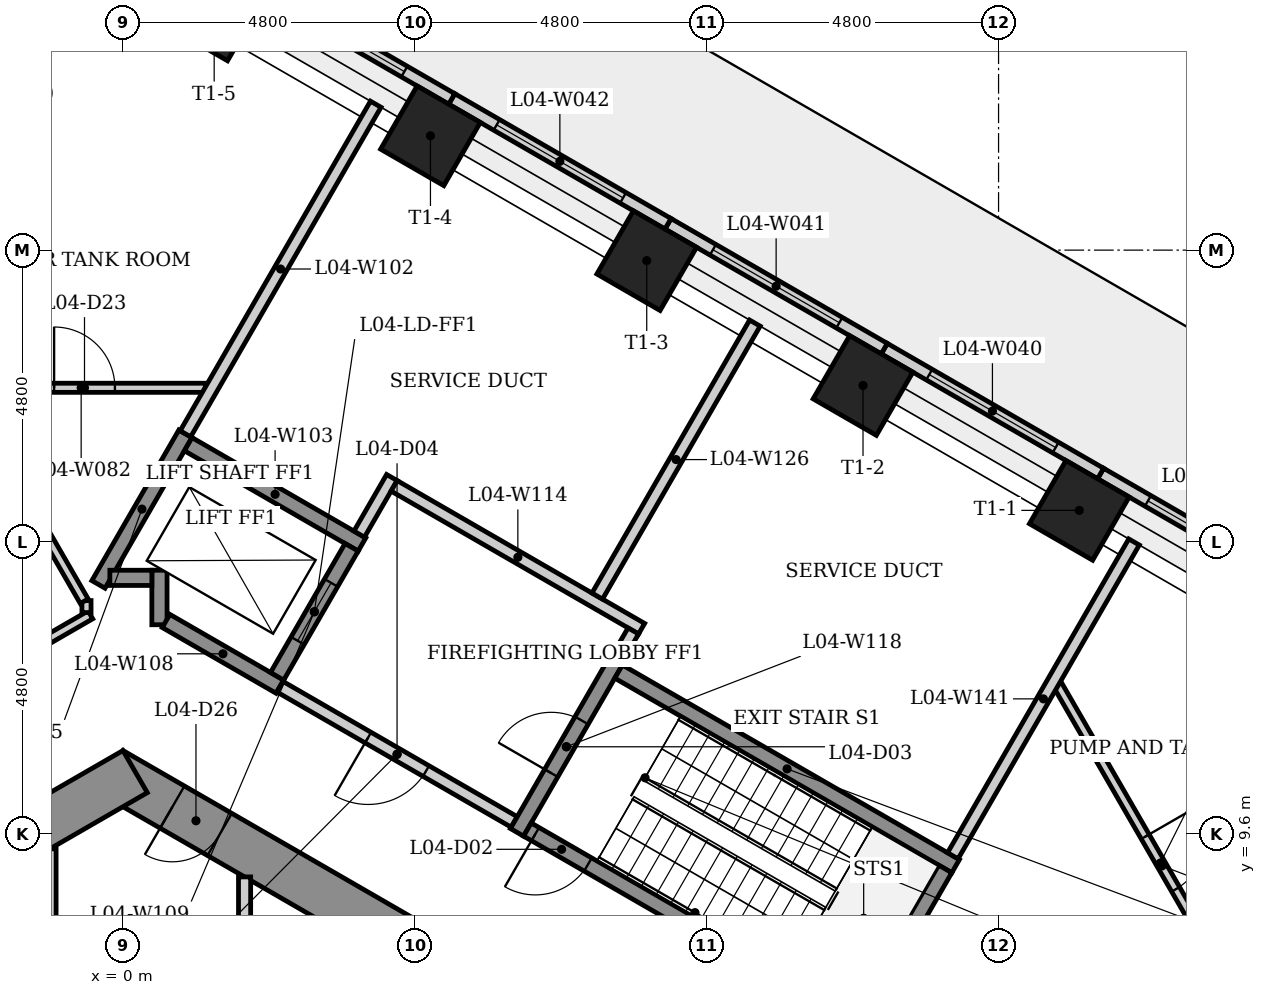
"""IFC4 building model, lengths in metres.
Left out: names, types, materials, properties, quantities, classifications, styles, units other than length and angle.
Written with IfcOpenShell. Run it as: python <this file> out.ifc"""

import sys

from ifc_helpers import new_model, si_unit, direction, frame, frame_2d, origin, origin_2d, place, context, subcontext, project, spatial, rectangle, extrude, element, fill, save


model = new_model("IFC4")
c1 = context("Model", 3, precision=1e-05, world=origin(), true_north=direction((0.0, 1.0)))
c2 = subcontext(c1, "Body", "Model", "MODEL_VIEW")
j1 = project(units=[si_unit("LENGTHUNIT", "METRE"), si_unit("PLANEANGLEUNIT", "RADIAN")], contexts=[c1])
p1 = place(None, origin())
s1 = spatial("IfcSite", under=j1, at=p1, CompositionType="ELEMENT")
p2 = place(p1, origin())
s2 = spatial("IfcBuilding", under=s1, at=p2, CompositionType="ELEMENT")
p3 = place(p2, frame((0.0, 0.0, 20.5)))
s3 = spatial("IfcBuildingStorey", under=s2, at=p3, CompositionType="ELEMENT", Elevation=20.5)
p4 = place(p3, frame((9.3, 5.138, 0.0), z_axis=(0.0, 0.0, 1.0), x_axis=(-0.866023993627, 0.500002442456, 0.0)))
e1 = element("IfcWall", 1, at=p4, inside=s3, PredefinedType="SHEAR", context=c2, shape_type="SweptSolid", body=[
    extrude(rectangle(XDim=10.97, YDim=0.8, at=frame_2d((5.485, 0.0))), origin(), (0.0, 0.0, 1.0), 5.0),
])
p5 = place(p4, frame((8.903, 0.0, 0.0)))
e2 = element("IfcOpeningElement", 2, at=p5, cuts=e1, PredefinedType="OPENING", context=c2, shape_type="SweptSolid", body=[
    extrude(rectangle(XDim=0.9, YDim=2.1, at=frame_2d((0.45, 1.05))), frame((0.0, 0.41, 0.0), z_axis=(0.0, -1.0, 0.0), x_axis=(1.0, 0.0, 0.0)), (0.0, 0.0, 1.0), 0.82),
])
p6 = place(p4, frame((2.269, 0.0, 0.0)))
e3 = element("IfcOpeningElement", 3, at=p6, cuts=e1, PredefinedType="OPENING", context=c2, shape_type="SweptSolid", body=[
    extrude(rectangle(XDim=0.9, YDim=2.1, at=frame_2d((0.45, 1.05))), frame((0.0, 0.41, 0.0), z_axis=(0.0, -1.0, 0.0), x_axis=(1.0, 0.0, 0.0)), (0.0, 0.0, 1.0), 0.82),
])
p7 = place(p3, frame((0.2, 10.623, 0.0), z_axis=(0.0, 0.0, 1.0), x_axis=(-0.866023993627, -0.500002442456, 0.0)))
e4 = element("IfcWall", 4, at=p7, inside=s3, PredefinedType="SHEAR", context=c2, shape_type="SweptSolid", body=[
    extrude(rectangle(XDim=10.97, YDim=0.8, at=frame_2d((5.485, 0.0))), origin(), (0.0, 0.0, 1.0), 5.0),
])
p8 = place(p7, frame((7.339, 0.0, 0.0)))
e5 = element("IfcOpeningElement", 5, at=p8, cuts=e4, PredefinedType="OPENING", context=c2, shape_type="SweptSolid", body=[
    extrude(rectangle(XDim=0.9, YDim=2.1, at=frame_2d((0.45, 1.05))), frame((0.0, 0.41, 0.0), z_axis=(0.0, -1.0, 0.0), x_axis=(1.0, 0.0, 0.0)), (0.0, 0.0, 1.0), 0.82),
])
for number, where, z_axis, x_axis in (
    (6, (15.728, 14.92, 0.0), (0.0, 0.0, 1.0), (0.5, 0.866, 0.0)),
    (7, (12.171, 16.973, 0.0), (0.0, 0.0, 1.0), (0.5, 0.866, 0.0)),
    (8, (8.614, 19.027, 0.0), (0.0, 0.0, 1.0), (0.5, 0.866, 0.0)),
    (9, (5.057, 21.08, 0.0), (0.0, 0.0, 1.0), (0.5, 0.866, 0.0)),
    (10, (1.5, 23.134, 0.0), (0.0, 0.0, 1.0), (0.5, 0.866, 0.0)),
    (11, (-1.5, 23.134, 0.0), (0.0, 0.0, 1.0), (-0.5, 0.866, 0.0)),
):
    element("IfcColumn", number, at=place(p3, frame(where, z_axis=z_axis, x_axis=x_axis)), inside=s3, PredefinedType="COLUMN", context=c2, shape_type="SweptSolid", body=[
        extrude(rectangle(XDim=1.2, YDim=1.2, at=origin_2d()), origin(), (0.0, 0.0, 1.0), 5.0),
    ])
p9 = place(p3, frame((19.714, 13.426, 0.0), z_axis=(0.0, 0.0, 1.0), x_axis=(-0.866041321553, 0.499972428603, 0.0)))
e12 = element("IfcWall", 12, at=p9, inside=s3, PredefinedType="SOLIDWALL", context=c2, shape_type="SweptSolid", body=[
    extrude(rectangle(XDim=4.199, YDim=0.2, at=frame_2d((2.1, 0.0))), origin(), (0.0, 0.0, 1.0), 4.88),
])
p10 = place(p9, frame((0.899, 0.0, 0.8)))
e13 = element("IfcOpeningElement", 13, at=p10, cuts=e12, PredefinedType="OPENING", context=c2, shape_type="SweptSolid", body=[
    extrude(rectangle(XDim=2.4, YDim=2.4, at=frame_2d((1.2, 1.2))), frame((0.0, 0.11, 0.0), z_axis=(0.0, -1.0, 0.0), x_axis=(1.0, 0.0, 0.0)), (0.0, 0.0, 1.0), 0.22),
])
p11 = place(p3, frame((16.078, 15.526, 0.0), z_axis=(0.0, 0.0, 1.0), x_axis=(-0.866029215606, 0.499993397673, 0.0)))
e14 = element("IfcWall", 14, at=p11, inside=s3, PredefinedType="SOLIDWALL", context=c2, shape_type="SweptSolid", body=[
    extrude(rectangle(XDim=4.108, YDim=0.2, at=frame_2d((2.054, 0.0))), origin(), (0.0, 0.0, 1.0), 4.88),
])
p12 = place(p11, frame((0.854, 0.0, 0.8)))
e15 = element("IfcOpeningElement", 15, at=p12, cuts=e14, PredefinedType="OPENING", context=c2, shape_type="SweptSolid", body=[
    extrude(rectangle(XDim=2.4, YDim=2.4, at=frame_2d((1.2, 1.2))), frame((0.0, 0.11, 0.0), z_axis=(0.0, -1.0, 0.0), x_axis=(1.0, 0.0, 0.0)), (0.0, 0.0, 1.0), 0.22),
])
p13 = place(p3, frame((12.52, 17.58, 0.0), z_axis=(0.0, 0.0, 1.0), x_axis=(-0.866021252249, 0.500007190601, 0.0)))
e16 = element("IfcWall", 16, at=p13, inside=s3, PredefinedType="SOLIDWALL", context=c2, shape_type="SweptSolid", body=[
    extrude(rectangle(XDim=4.107, YDim=0.2, at=frame_2d((2.053, 0.0))), origin(), (0.0, 0.0, 1.0), 4.88),
])
p14 = place(p13, frame((0.854, 0.0, 0.8)))
e17 = element("IfcOpeningElement", 17, at=p14, cuts=e16, PredefinedType="OPENING", context=c2, shape_type="SweptSolid", body=[
    extrude(rectangle(XDim=2.4, YDim=2.4, at=frame_2d((1.2, 1.2))), frame((0.0, 0.11, 0.0), z_axis=(0.0, -1.0, 0.0), x_axis=(1.0, 0.0, 0.0)), (0.0, 0.0, 1.0), 0.22),
])
p15 = place(p3, frame((8.964, 19.633, 0.0), z_axis=(0.0, 0.0, 1.0), x_axis=(-0.866010373586, 0.500026032164, 0.0)))
e18 = element("IfcWall", 18, at=p15, inside=s3, PredefinedType="SOLIDWALL", context=c2, shape_type="SweptSolid", body=[
    extrude(rectangle(XDim=4.107, YDim=0.2, at=frame_2d((2.054, 0.0))), origin(), (0.0, 0.0, 1.0), 4.88),
])
p16 = place(p15, frame((0.854, 0.0, 0.8)))
e19 = element("IfcOpeningElement", 19, at=p16, cuts=e18, PredefinedType="OPENING", context=c2, shape_type="SweptSolid", body=[
    extrude(rectangle(XDim=2.4, YDim=2.4, at=frame_2d((1.2, 1.2))), frame((0.0, 0.11, 0.0), z_axis=(0.0, -1.0, 0.0), x_axis=(1.0, 0.0, 0.0)), (0.0, 0.0, 1.0), 0.22),
])
p17 = place(p3, frame((5.407, 21.687, 0.0), z_axis=(0.0, 0.0, 1.0), x_axis=(-0.866016145416, 0.500016035621, 0.0)))
e20 = element("IfcWall", 20, at=p17, inside=s3, PredefinedType="SOLIDWALL", context=c2, shape_type="SweptSolid", body=[
    extrude(rectangle(XDim=4.199, YDim=0.2, at=frame_2d((2.1, 0.0))), origin(), (0.0, 0.0, 1.0), 4.88),
])
p18 = place(p17, frame((0.9, 0.0, 0.8)))
e21 = element("IfcOpeningElement", 21, at=p18, cuts=e20, PredefinedType="OPENING", context=c2, shape_type="SweptSolid", body=[
    extrude(rectangle(XDim=2.4, YDim=2.4, at=frame_2d((1.2, 1.2))), frame((0.0, 0.11, 0.0), z_axis=(0.0, -1.0, 0.0), x_axis=(1.0, 0.0, 0.0)), (0.0, 0.0, 1.0), 0.22),
])
p19 = place(p3, frame((-10.825, 7.26, 0.0), z_axis=(0.0, 0.0, 1.0), x_axis=(0.866026819738, 0.499997547488, 0.0)))
e22 = element("IfcWall", 22, at=p19, inside=s3, PredefinedType="PARTITIONING", context=c2, shape_type="SweptSolid", body=[
    extrude(rectangle(XDim=11.882, YDim=0.15, at=frame_2d((5.941, 0.0))), origin(), (0.0, 0.0, 1.0), 4.65),
])
p20 = place(p19, frame((7.264, 0.0, 0.0)))
e23 = element("IfcOpeningElement", 23, at=p20, cuts=e22, PredefinedType="OPENING", context=c2, shape_type="SweptSolid", body=[
    extrude(rectangle(XDim=1.0, YDim=2.1, at=frame_2d((0.5, 1.05))), frame((0.0, 0.085, 0.0), z_axis=(0.0, -1.0, 0.0), x_axis=(1.0, 0.0, 0.0)), (0.0, 0.0, 1.0), 0.17),
])
p21 = place(p3, frame((-2.739, 16.936, 0.0), z_axis=(0.0, 0.0, 1.0), x_axis=(1.0, 0.0, 0.0)))
e24 = element("IfcWall", 24, at=p21, inside=s3, PredefinedType="PARTITIONING", context=c2, shape_type="SweptSolid", body=[
    extrude(rectangle(XDim=4.103, YDim=0.15, at=frame_2d((2.052, 0.0))), origin(), (0.0, 0.0, 1.0), 4.65),
])
p22 = place(p21, frame((1.606, 0.0, 0.0)))
e25 = element("IfcOpeningElement", 25, at=p22, cuts=e24, PredefinedType="OPENING", context=c2, shape_type="SweptSolid", body=[
    extrude(rectangle(XDim=1.0, YDim=2.1, at=frame_2d((0.5, 1.05))), frame((0.0, 0.085, 0.0), z_axis=(0.0, -1.0, 0.0), x_axis=(1.0, 0.0, 0.0)), (0.0, 0.0, 1.0), 0.17),
])
p23 = place(p3, frame((-1.2, 9.353, 0.0), z_axis=(0.0, 0.0, 1.0), x_axis=(0.0, -1.0, 0.0)))
e26 = element("IfcWall", 26, at=p23, inside=s3, PredefinedType="PARTITIONING", context=c2, shape_type="SweptSolid", body=[
    extrude(rectangle(XDim=4.078, YDim=0.2, at=frame_2d((2.039, 0.0))), origin(), (0.0, 0.0, 1.0), 4.65),
])
p24 = place(p3, frame((-0.6, 13.239, 0.0), z_axis=(0.0, 0.0, 1.0), x_axis=(0.0, 1.0, 0.0)))
e27 = element("IfcWall", 27, at=p24, inside=s3, PredefinedType="PARTITIONING", context=c2, shape_type="SweptSolid", body=[
    extrude(rectangle(XDim=0.197, YDim=0.15, at=frame_2d((0.099, 0.0))), origin(), (0.0, 0.0, 1.0), 4.65),
])
p25 = place(p3, frame((-0.637, 13.426, 0.0), z_axis=(0.0, 0.0, 1.0), x_axis=(-0.500046503579, 0.865998553266, 0.0)))
e28 = element("IfcWall", 28, at=p25, inside=s3, PredefinedType="PARTITIONING", context=c2, shape_type="SweptSolid", body=[
    extrude(rectangle(XDim=3.978, YDim=0.15, at=frame_2d((1.989, 0.0))), origin(), (0.0, 0.0, 1.0), 4.65),
])
p26 = place(p3, frame((-0.403, 13.702, 0.0), z_axis=(0.0, 0.0, 1.0), x_axis=(0.499976111731, 0.866039195244, 0.0)))
e29 = element("IfcWall", 29, at=p26, inside=s3, PredefinedType="SHEAR", context=c2, shape_type="SweptSolid", body=[
    extrude(rectangle(XDim=2.861, YDim=0.25, at=frame_2d((1.43, 0.0))), origin(), (0.0, 0.0, 1.0), 4.65),
])
p27 = place(p3, frame((0.6, 13.039, 0.0), z_axis=(0.0, 0.0, 1.0), x_axis=(0.0, 1.0, 0.0)))
e30 = element("IfcWall", 30, at=p27, inside=s3, PredefinedType="SHEAR", context=c2, shape_type="SweptSolid", body=[
    extrude(rectangle(XDim=0.896, YDim=0.25, at=frame_2d((0.448, 0.0))), origin(), (0.0, 0.0, 1.0), 4.65),
])
p28 = place(p3, frame((0.475, 13.81, 0.0), z_axis=(0.0, 0.0, 1.0), x_axis=(-1.0, 0.0, 0.0)))
e31 = element("IfcWall", 31, at=p28, inside=s3, PredefinedType="SHEAR", context=c2, shape_type="SweptSolid", body=[
    extrude(rectangle(XDim=0.691, YDim=0.25, at=frame_2d((0.345, 0.0))), origin(), (0.0, 0.0, 1.0), 5.0),
])
p29 = place(p3, frame((1.027, 16.179, 0.0), z_axis=(0.0, 0.0, 1.0), x_axis=(0.499998165157, 0.866026463129, 0.0)))
e32 = element("IfcWall", 32, at=p29, inside=s3, PredefinedType="PLUMBINGWALL", context=c2, shape_type="SweptSolid", body=[
    extrude(rectangle(XDim=6.26, YDim=0.2, at=frame_2d((3.13, 0.0))), origin(), (0.0, 0.0, 1.0), 4.65),
])
p30 = place(p3, frame((1.073, 16.008, 0.0), z_axis=(0.0, 0.0, 1.0), x_axis=(0.866040211805, -0.499974350878, 0.0)))
e33 = element("IfcWall", 33, at=p30, inside=s3, PredefinedType="SHEAR", context=c2, shape_type="SweptSolid", body=[
    extrude(rectangle(XDim=3.3, YDim=0.25, at=frame_2d((1.65, 0.0))), origin(), (0.0, 0.0, 1.0), 4.65),
])
p31 = place(p3, frame((2.0, 8.891, 0.0), z_axis=(0.0, 0.0, 1.0), x_axis=(0.0, -1.0, 0.0)))
e34 = element("IfcWall", 34, at=p31, inside=s3, PredefinedType="PARTITIONING", context=c2, shape_type="SweptSolid", body=[
    extrude(rectangle(XDim=3.616, YDim=0.2, at=frame_2d((1.808, 0.0))), origin(), (0.0, 0.0, 1.0), 4.65),
])
p32 = place(p3, frame((2.581, 12.02, 0.0), z_axis=(0.0, 0.0, 1.0), x_axis=(-0.86603892542, 0.499976579108, 0.0)))
e35 = element("IfcWall", 35, at=p32, inside=s3, PredefinedType="SHEAR", context=c2, shape_type="SweptSolid", body=[
    extrude(rectangle(XDim=2.162, YDim=0.25, at=frame_2d((1.081, 0.0))), origin(), (0.0, 0.0, 1.0), 4.65),
])
p33 = place(p3, frame((2.535, 12.191, 0.0), z_axis=(0.0, 0.0, 1.0), x_axis=(0.500061746146, 0.865989751695, 0.0)))
e36 = element("IfcWall", 36, at=p33, inside=s3, PredefinedType="SHEAR", context=c2, shape_type="SweptSolid", body=[
    extrude(rectangle(XDim=2.45, YDim=0.25, at=frame_2d((1.225, 0.0))), origin(), (0.0, 0.0, 1.0), 5.0),
])
p34 = place(p33, frame((0.675, 0.0, 0.0)))
e37 = element("IfcOpeningElement", 37, at=p34, cuts=e36, PredefinedType="OPENING", context=c2, shape_type="SweptSolid", body=[
    extrude(rectangle(XDim=1.1, YDim=2.1, at=frame_2d((0.55, 1.05))), frame((0.0, 0.135, 0.0), z_axis=(0.0, -1.0, 0.0), x_axis=(1.0, 0.0, 0.0)), (0.0, 0.0, 1.0), 0.27),
])
p35 = place(p3, frame((3.885, 14.529, 0.0), z_axis=(0.0, 0.0, 1.0), x_axis=(0.499997628298, 0.866026773083, 0.0)))
e38 = element("IfcWall", 38, at=p35, inside=s3, PredefinedType="PLUMBINGWALL", context=c2, shape_type="SweptSolid", body=[
    extrude(rectangle(XDim=1.075, YDim=0.2, at=frame_2d((0.538, 0.0))), origin(), (0.0, 0.0, 1.0), 4.65),
])
p36 = place(p3, frame((4.459, 15.323, 0.0), z_axis=(0.0, 0.0, 1.0), x_axis=(0.866016039709, -0.500016218704, 0.0)))
e39 = element("IfcWall", 39, at=p36, inside=s3, PredefinedType="PLUMBINGWALL", context=c2, shape_type="SweptSolid", body=[
    extrude(rectangle(XDim=4.7, YDim=0.2, at=frame_2d((2.35, 0.0))), origin(), (0.0, 0.0, 1.0), 4.65),
])
p37 = place(p3, frame((6.435, 9.795, 0.0), z_axis=(0.0, 0.0, 1.0), x_axis=(-0.866012907634, 0.500021643343, 0.0)))
e40 = element("IfcWall", 40, at=p37, inside=s3, PredefinedType="PARTITIONING", context=c2, shape_type="SweptSolid", body=[
    extrude(rectangle(XDim=4.45, YDim=0.2, at=frame_2d((2.225, 0.0))), origin(), (0.0, 0.0, 1.0), 4.65),
])
p38 = place(p37, frame((1.675, 0.0, 0.0)))
e41 = element("IfcOpeningElement", 41, at=p38, cuts=e40, PredefinedType="OPENING", context=c2, shape_type="SweptSolid", body=[
    extrude(rectangle(XDim=1.1, YDim=2.1, at=frame_2d((0.55, 1.05))), frame((0.0, 0.11, 0.0), z_axis=(0.0, -1.0, 0.0), x_axis=(1.0, 0.0, 0.0)), (0.0, 0.0, 1.0), 0.22),
])
p39 = place(p3, frame((6.48, 9.624, 0.0), z_axis=(0.0, 0.0, 1.0), x_axis=(0.500017246033, 0.866015446554, 0.0)))
e42 = element("IfcWall", 42, at=p39, inside=s3, PredefinedType="SHEAR", context=c2, shape_type="SweptSolid", body=[
    extrude(rectangle(XDim=3.25, YDim=0.25, at=frame_2d((1.625, 0.0))), origin(), (0.0, 0.0, 1.0), 4.65),
])
p40 = place(p39, frame((1.125, 0.0, 0.0)))
e43 = element("IfcOpeningElement", 43, at=p40, cuts=e42, PredefinedType="OPENING", context=c2, shape_type="SweptSolid", body=[
    extrude(rectangle(XDim=1.0, YDim=2.1, at=frame_2d((0.5, 1.05))), frame((0.0, 0.135, 0.0), z_axis=(0.0, -1.0, 0.0), x_axis=(1.0, 0.0, 0.0)), (0.0, 0.0, 1.0), 0.27),
])
p41 = place(p3, frame((7.8, 13.51, 0.0), z_axis=(0.0, 0.0, 1.0), x_axis=(0.499998276493, 0.866026398849, 0.0)))
e44 = element("IfcWall", 44, at=p41, inside=s3, PredefinedType="PLUMBINGWALL", context=c2, shape_type="SweptSolid", body=[
    extrude(rectangle(XDim=5.185, YDim=0.2, at=frame_2d((2.592, 0.0))), origin(), (0.0, 0.0, 1.0), 4.65),
])
p42 = place(p3, frame((8.151, 12.268, 0.0), z_axis=(0.0, 0.0, 1.0), x_axis=(0.866025499775, -0.499999833739, 0.0)))
e45 = element("IfcWall", 45, at=p42, inside=s3, PredefinedType="SHEAR", context=c2, shape_type="SweptSolid", body=[
    extrude(rectangle(XDim=6.4, YDim=0.25, at=frame_2d((3.2, 0.0))), origin(), (0.0, 0.0, 1.0), 4.65),
])
p43 = place(p3, frame((8.393, 12.937, 0.0), z_axis=(0.0, 0.0, 1.0), x_axis=(-0.500065409566, -0.86598763626, 0.0)))
e46 = element("IfcWall", 46, at=p43, inside=s3, PredefinedType="PLUMBINGWALL", context=c2, shape_type="SweptSolid", body=[
    extrude(rectangle(XDim=0.575, YDim=0.2, at=frame_2d((0.288, 0.0))), origin(), (0.0, 0.0, 1.0), 4.65),
])
p44 = place(p3, frame((12.194, 6.47, 0.0), z_axis=(0.0, 0.0, 1.0), x_axis=(-0.866025499775, 0.499999833739, 0.0)))
e47 = element("IfcWall", 47, at=p44, inside=s3, PredefinedType="SHEAR", context=c2, shape_type="SweptSolid", body=[
    extrude(rectangle(XDim=6.4, YDim=0.25, at=frame_2d((3.2, 0.0))), origin(), (0.0, 0.0, 1.0), 4.65),
])
p45 = place(p44, frame((5.25, 0.0, 0.0)))
e48 = element("IfcOpeningElement", 48, at=p45, cuts=e47, PredefinedType="OPENING", context=c2, shape_type="SweptSolid", body=[
    extrude(rectangle(XDim=1.0, YDim=2.1, at=frame_2d((0.5, 1.05))), frame((0.0, 0.135, 0.0), z_axis=(0.0, -1.0, 0.0), x_axis=(1.0, 0.0, 0.0)), (0.0, 0.0, 1.0), 0.27),
])
p46 = place(p3, frame((13.523, 9.022, 0.0), z_axis=(0.0, 0.0, 1.0), x_axis=(-0.500034990121, -0.866005201286, 0.0)))
e49 = element("IfcWall", 49, at=p46, inside=s3, PredefinedType="SHEAR", context=c2, shape_type="SweptSolid", body=[
    extrude(rectangle(XDim=2.75, YDim=0.25, at=frame_2d((1.375, 0.0))), origin(), (0.0, 0.0, 1.0), 4.65),
])
p47 = place(p3, frame((15.371, 12.049, 0.0), z_axis=(0.0, 0.0, 1.0), x_axis=(0.49999297727, -0.866029458321, 0.0)))
e50 = element("IfcWall", 50, at=p47, inside=s3, PredefinedType="PARTITIONING", context=c2, shape_type="SweptSolid", body=[
    extrude(rectangle(XDim=6.875, YDim=0.15, at=frame_2d((3.437, 0.0))), origin(), (0.0, 0.0, 1.0), 4.65),
])
p48 = place(p47, frame((2.882, 0.0, 0.0)))
e51 = element("IfcOpeningElement", 51, at=p48, cuts=e50, PredefinedType="OPENING", context=c2, shape_type="SweptSolid", body=[
    extrude(rectangle(XDim=1.0, YDim=2.1, at=frame_2d((0.5, 1.05))), frame((0.0, 0.085, 0.0), z_axis=(0.0, -1.0, 0.0), x_axis=(1.0, 0.0, 0.0)), (0.0, 0.0, 1.0), 0.17),
])
p49 = place(p3, frame((13.648, 9.239, 0.0), z_axis=(0.0, 0.0, 1.0), x_axis=(0.499994325412, 0.866028679985, 0.0)))
e52 = element("IfcWall", 52, at=p49, inside=s3, PredefinedType="PLUMBINGWALL", context=c2, shape_type="SweptSolid", body=[
    extrude(rectangle(XDim=5.959, YDim=0.2, at=frame_2d((2.98, 0.0))), origin(), (0.0, 0.0, 1.0), 4.65),
])
p50 = place(p10, origin())
e53 = element("IfcWindow", 53, at=p50, inside=s3, PartitioningType="SINGLE_PANEL", PredefinedType="WINDOW", context=c2, shape_type="SweptSolid", body=[
    extrude(rectangle(XDim=2.4, YDim=2.4, at=frame_2d((1.2, 1.2))), frame((0.0, 0.03, 0.0), z_axis=(0.0, -1.0, 0.0), x_axis=(1.0, 0.0, 0.0)), (0.0, 0.0, 1.0), 0.06),
])
fill(e13, e53)
p51 = place(p12, origin())
e54 = element("IfcWindow", 54, at=p51, inside=s3, PartitioningType="SINGLE_PANEL", PredefinedType="WINDOW", context=c2, shape_type="SweptSolid", body=[
    extrude(rectangle(XDim=2.4, YDim=2.4, at=frame_2d((1.2, 1.2))), frame((0.0, 0.03, 0.0), z_axis=(0.0, -1.0, 0.0), x_axis=(1.0, 0.0, 0.0)), (0.0, 0.0, 1.0), 0.06),
])
fill(e15, e54)
p52 = place(p14, origin())
e55 = element("IfcWindow", 55, at=p52, inside=s3, PartitioningType="SINGLE_PANEL", PredefinedType="WINDOW", context=c2, shape_type="SweptSolid", body=[
    extrude(rectangle(XDim=2.4, YDim=2.4, at=frame_2d((1.2, 1.2))), frame((0.0, 0.03, 0.0), z_axis=(0.0, -1.0, 0.0), x_axis=(1.0, 0.0, 0.0)), (0.0, 0.0, 1.0), 0.06),
])
fill(e17, e55)
p53 = place(p16, origin())
e56 = element("IfcWindow", 56, at=p53, inside=s3, PartitioningType="SINGLE_PANEL", PredefinedType="WINDOW", context=c2, shape_type="SweptSolid", body=[
    extrude(rectangle(XDim=2.4, YDim=2.4, at=frame_2d((1.2, 1.2))), frame((0.0, 0.03, 0.0), z_axis=(0.0, -1.0, 0.0), x_axis=(1.0, 0.0, 0.0)), (0.0, 0.0, 1.0), 0.06),
])
fill(e19, e56)
p54 = place(p18, origin())
e57 = element("IfcWindow", 57, at=p54, inside=s3, PartitioningType="SINGLE_PANEL", PredefinedType="WINDOW", context=c2, shape_type="SweptSolid", body=[
    extrude(rectangle(XDim=2.4, YDim=2.4, at=frame_2d((1.2, 1.2))), frame((0.0, 0.03, 0.0), z_axis=(0.0, -1.0, 0.0), x_axis=(1.0, 0.0, 0.0)), (0.0, 0.0, 1.0), 0.06),
])
fill(e21, e57)
p55 = place(p45, origin())
e58 = element("IfcDoor", 58, at=p55, inside=s3, OperationType="SINGLE_SWING_RIGHT", PredefinedType="DOOR", context=c2, shape_type="SweptSolid", body=[
    extrude(rectangle(XDim=1.0, YDim=2.1, at=frame_2d((0.5, 1.05))), frame((0.0, 0.025, 0.0), z_axis=(0.0, -1.0, 0.0), x_axis=(1.0, 0.0, 0.0)), (0.0, 0.0, 1.0), 0.05),
])
fill(e48, e58)
p56 = place(p40, origin())
e59 = element("IfcDoor", 59, at=p56, inside=s3, OperationType="SINGLE_SWING_LEFT", PredefinedType="DOOR", context=c2, shape_type="SweptSolid", body=[
    extrude(rectangle(XDim=1.0, YDim=2.1, at=frame_2d((0.5, 1.05))), frame((0.0, 0.025, 0.0), z_axis=(0.0, -1.0, 0.0), x_axis=(1.0, 0.0, 0.0)), (0.0, 0.0, 1.0), 0.05),
])
fill(e43, e59)
p57 = place(p38, origin())
e60 = element("IfcDoor", 60, at=p57, inside=s3, OperationType="SINGLE_SWING_RIGHT", PredefinedType="DOOR", context=c2, shape_type="SweptSolid", body=[
    extrude(rectangle(XDim=1.1, YDim=2.1, at=frame_2d((0.55, 1.05))), frame((0.0, 0.025, 0.0), z_axis=(0.0, -1.0, 0.0), x_axis=(1.0, 0.0, 0.0)), (0.0, 0.0, 1.0), 0.05),
])
fill(e41, e60)
p58 = place(p34, origin())
e61 = element("IfcDoor", 61, at=p58, inside=s3, OperationType="SLIDING_TO_LEFT", PredefinedType="DOOR", context=c2, shape_type="SweptSolid", body=[
    extrude(rectangle(XDim=1.1, YDim=2.1, at=frame_2d((0.55, 1.05))), frame((0.0, 0.025, 0.0), z_axis=(0.0, -1.0, 0.0), x_axis=(1.0, 0.0, 0.0)), (0.0, 0.0, 1.0), 0.05),
])
fill(e37, e61)
p59 = place(p48, origin())
e62 = element("IfcDoor", 62, at=p59, inside=s3, OperationType="SINGLE_SWING_LEFT", PredefinedType="DOOR", context=c2, shape_type="SweptSolid", body=[
    extrude(rectangle(XDim=1.0, YDim=2.1, at=frame_2d((0.5, 1.05))), frame((0.0, 0.025, 0.0), z_axis=(0.0, -1.0, 0.0), x_axis=(1.0, 0.0, 0.0)), (0.0, 0.0, 1.0), 0.05),
])
fill(e51, e62)
p60 = place(p22, origin())
e63 = element("IfcDoor", 63, at=p60, inside=s3, OperationType="SINGLE_SWING_LEFT", PredefinedType="DOOR", context=c2, shape_type="SweptSolid", body=[
    extrude(rectangle(XDim=1.0, YDim=2.1, at=frame_2d((0.5, 1.05))), frame((0.0, 0.025, 0.0), z_axis=(0.0, -1.0, 0.0), x_axis=(1.0, 0.0, 0.0)), (0.0, 0.0, 1.0), 0.05),
])
fill(e25, e63)
p61 = place(p5, origin())
e64 = element("IfcDoor", 64, at=p61, inside=s3, OperationType="SINGLE_SWING_RIGHT", PredefinedType="DOOR", context=c2, shape_type="SweptSolid", body=[
    extrude(rectangle(XDim=0.9, YDim=2.1, at=frame_2d((0.45, 1.05))), frame((0.0, 0.025, 0.0), z_axis=(0.0, -1.0, 0.0), x_axis=(1.0, 0.0, 0.0)), (0.0, 0.0, 1.0), 0.05),
])
fill(e2, e64)
save(model, sys.argv[1])
